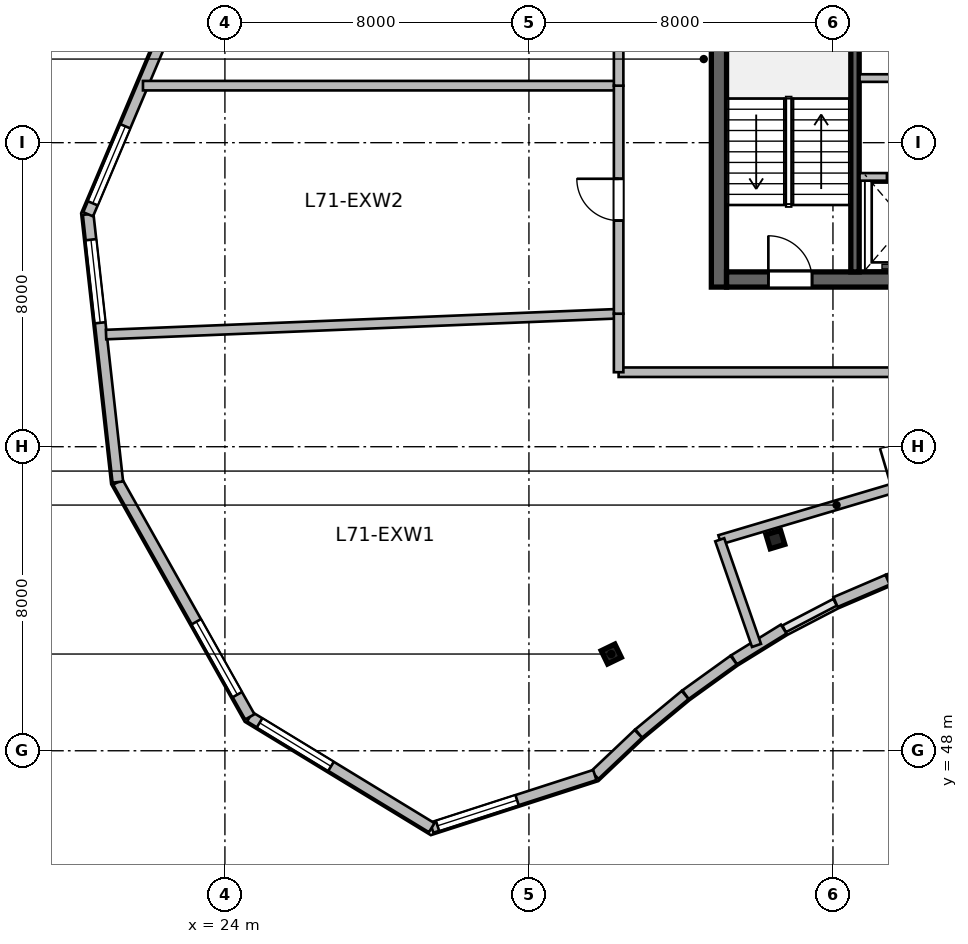
"""IFC4 building model, lengths in metres.
Left out: names, types, materials, properties, quantities, classifications, styles, units other than length and angle.
Written with IfcOpenShell. Run it as: python <this file> out.ifc"""

import sys

from ifc_helpers import new_model, si_unit, direction, frame, frame_2d, origin, origin_2d, place, context, subcontext, project, spatial, rectangle, i_section, extrude, source, transform, mapped, element, fill, save


model = new_model("IFC4")
c1 = context("Model", 3, precision=1e-05, world=origin(), true_north=direction((0.0, 1.0)))
c2 = subcontext(c1, "Body", "Model", "MODEL_VIEW")
j1 = project(units=[si_unit("LENGTHUNIT", "METRE"), si_unit("PLANEANGLEUNIT", "RADIAN")], contexts=[c1])
p1 = place(None, origin())
s1 = spatial("IfcSite", under=j1, at=p1, CompositionType="ELEMENT")
p2 = place(p1, origin())
s2 = spatial("IfcBuilding", under=s1, at=p2, CompositionType="ELEMENT")
p3 = place(p2, frame((0.0, 0.0, 291.3)))
s3 = spatial("IfcBuildingStorey", under=s2, at=p3, CompositionType="ELEMENT", Elevation=291.3)
m1 = source(origin(), c2, "Body", "SweptSolid", [
    extrude(rectangle(XDim=12.0, YDim=0.4, at=frame_2d((6.0, 0.0))), origin(), (0.0, 0.0, 1.0), 3.9),
])
p4 = place(p3, frame((37.0, 60.2, 0.0), z_axis=(0.0, 0.0, 1.0), x_axis=(0.0, 1.0, 0.0)))
e1 = element("IfcWall", 1, at=p4, inside=s3, PredefinedType="SHEAR", context=c2, shape_type="MappedRepresentation", body=[
    mapped(m1, transform((0.0, 0.0, 0.0), scale=1.0)),
])
m2 = source(origin(), c2, "Body", "SweptSolid", [
    extrude(rectangle(XDim=21.6, YDim=0.4, at=frame_2d((10.8, 0.0))), origin(), (0.0, 0.0, 1.0), 3.9),
])
p5 = place(p3, frame((37.2, 60.4, 0.0), z_axis=(0.0, 0.0, 1.0), x_axis=(1.0, 0.0, 0.0)))
e2 = element("IfcWall", 2, at=p5, inside=s3, PredefinedType="SHEAR", context=c2, shape_type="MappedRepresentation", body=[
    mapped(m2, transform((0.0, 0.0, 0.0), scale=1.0)),
])
p6 = place(p5, frame((1.1, 0.0, 0.0)))
e3 = element("IfcOpeningElement", 3, at=p6, cuts=e2, PredefinedType="OPENING", context=c2, shape_type="SweptSolid", body=[
    extrude(rectangle(XDim=1.15, YDim=2.15, at=frame_2d((0.575, 1.075))), frame((0.0, 0.21, 0.0), z_axis=(0.0, -1.0, 0.0), x_axis=(1.0, 0.0, 0.0)), (0.0, 0.0, 1.0), 0.42),
])
p7 = place(p5, frame((19.5, 0.0, 0.0)))
e4 = element("IfcOpeningElement", 4, at=p7, cuts=e2, PredefinedType="OPENING", context=c2, shape_type="SweptSolid", body=[
    extrude(rectangle(XDim=0.9, YDim=2.1, at=frame_2d((0.45, 1.05))), frame((0.0, 0.21, 0.0), z_axis=(0.0, -1.0, 0.0), x_axis=(1.0, 0.0, 0.0)), (0.0, 0.0, 1.0), 0.42),
])
p8 = place(p5, frame((12.02, 0.0, 0.0)))
e5 = element("IfcOpeningElement", 5, at=p8, cuts=e2, PredefinedType="OPENING", context=c2, shape_type="SweptSolid", body=[
    extrude(rectangle(XDim=1.6, YDim=2.15, at=frame_2d((0.8, 1.075))), frame((0.0, 0.21, 0.0), z_axis=(0.0, -1.0, 0.0), x_axis=(1.0, 0.0, 0.0)), (0.0, 0.0, 1.0), 0.42),
])
m3 = source(origin(), c2, "Body", "SweptSolid", [
    extrude(rectangle(XDim=11.2, YDim=0.22, at=frame_2d((5.6, 0.0))), origin(), (0.0, 0.0, 1.0), 3.9),
])
p9 = place(p3, frame((40.58, 60.6, 0.0), z_axis=(0.0, 0.0, 1.0), x_axis=(0.0, 1.0, 0.0)))
e6 = element("IfcWall", 6, at=p9, inside=s3, PredefinedType="SHEAR", context=c2, shape_type="MappedRepresentation", body=[
    mapped(m3, transform((0.0, 0.0, 0.0), scale=1.0)),
])
m4 = source(origin(), c2, "Body", "SweptSolid", [
    extrude(i_section(OverallWidth=0.399, OverallDepth=0.387, WebThickness=0.021, FlangeThickness=0.033, at=origin_2d()), origin(), (0.0, 0.0, 1.0), 3.9),
])
for number, where, z_axis, x_axis in (
    (7, (34.166, 50.545, 0.0), (0.0, 0.0, 1.0), (-0.436, 0.9, 0.0)),
    (8, (38.485, 53.558, 0.0), (0.0, 0.0, 1.0), (-0.289, 0.957, 0.0)),
):
    element("IfcColumn", number, at=place(p3, frame(where, z_axis=z_axis, x_axis=x_axis)), inside=s3, PredefinedType="COLUMN", context=c2, shape_type="MappedRepresentation", body=[
        mapped(m4, transform((0.0, 0.0, 0.0), scale=1.0)),
    ])
m5 = source(origin(), c2, "Body", "SweptSolid", [
    extrude(rectangle(XDim=1.473, YDim=0.28, at=frame_2d((0.736, 0.0))), origin(), (0.0, 0.0, 1.0), 3.64),
])
p10 = place(p3, frame((42.845, 52.979, 0.0), z_axis=(0.0, 0.0, 1.0), x_axis=(-0.946641296917, -0.322289086026, 0.0)))
e9 = element("IfcWall", 9, at=p10, inside=s3, PredefinedType="SOLIDWALL", context=c2, shape_type="MappedRepresentation", body=[
    mapped(m5, transform((0.0, 0.0, 0.0), scale=1.0)),
])
m6 = source(origin(), c2, "Body", "SweptSolid", [
    extrude(rectangle(XDim=1.49, YDim=0.28, at=frame_2d((0.745, 0.0))), origin(), (0.0, 0.0, 1.0), 3.64),
])
p11 = place(p3, frame((41.438, 52.5, 0.0), z_axis=(0.0, 0.0, 1.0), x_axis=(-0.919009427656, -0.394235553799, 0.0)))
e10 = element("IfcWall", 10, at=p11, inside=s3, PredefinedType="SOLIDWALL", context=c2, shape_type="MappedRepresentation", body=[
    mapped(m6, transform((0.0, 0.0, 0.0), scale=1.0)),
])
m7 = source(origin(), c2, "Body", "SweptSolid", [
    extrude(rectangle(XDim=1.535, YDim=0.28, at=frame_2d((0.768, 0.0))), origin(), (0.0, 0.0, 1.0), 3.64),
])
p12 = place(p3, frame((38.704, 51.201, 0.0), z_axis=(0.0, 0.0, 1.0), x_axis=(-0.850756173541, -0.525560589449, 0.0)))
e11 = element("IfcWall", 11, at=p12, inside=s3, PredefinedType="SOLIDWALL", context=c2, shape_type="MappedRepresentation", body=[
    mapped(m7, transform((0.0, 0.0, 0.0), scale=1.0)),
])
m8 = source(origin(), c2, "Body", "SweptSolid", [
    extrude(rectangle(XDim=1.561, YDim=0.28, at=frame_2d((0.781, 0.0))), origin(), (0.0, 0.0, 1.0), 3.64),
])
p13 = place(p3, frame((37.387, 50.387, 0.0), z_axis=(0.0, 0.0, 1.0), x_axis=(-0.81154027425, -0.584296485758, 0.0)))
e12 = element("IfcWall", 12, at=p13, inside=s3, PredefinedType="SOLIDWALL", context=c2, shape_type="MappedRepresentation", body=[
    mapped(m8, transform((0.0, 0.0, 0.0), scale=1.0)),
])
m9 = source(origin(), c2, "Body", "SweptSolid", [
    extrude(rectangle(XDim=1.589, YDim=0.28, at=frame_2d((0.794, 0.0))), origin(), (0.0, 0.0, 1.0), 3.64),
])
p14 = place(p3, frame((36.11, 49.468, 0.0), z_axis=(0.0, 0.0, 1.0), x_axis=(-0.769805836273, -0.63827813251, 0.0)))
e13 = element("IfcWall", 13, at=p14, inside=s3, PredefinedType="SOLIDWALL", context=c2, shape_type="MappedRepresentation", body=[
    mapped(m9, transform((0.0, 0.0, 0.0), scale=1.0)),
])
m10 = source(origin(), c2, "Body", "SweptSolid", [
    extrude(rectangle(XDim=1.577, YDim=0.28, at=frame_2d((0.789, 0.0))), origin(), (0.0, 0.0, 1.0), 3.64),
])
p15 = place(p3, frame((34.878, 48.446, 0.0), z_axis=(0.0, 0.0, 1.0), x_axis=(-0.726119464467, -0.687568558998, 0.0)))
e14 = element("IfcWall", 14, at=p15, inside=s3, PredefinedType="SOLIDWALL", context=c2, shape_type="MappedRepresentation", body=[
    mapped(m10, transform((0.0, 0.0, 0.0), scale=1.0)),
])
m11 = source(origin(), c2, "Body", "SweptSolid", [
    extrude(rectangle(XDim=4.509, YDim=0.28, at=frame_2d((2.255, 0.0))), origin(), (0.0, 0.0, 1.0), 3.64),
])
p16 = place(p3, frame((33.733, 47.361, 0.0), z_axis=(0.0, 0.0, 1.0), x_axis=(-0.95162949292, -0.307247958828, 0.0)))
e15 = element("IfcWall", 15, at=p16, inside=s3, PredefinedType="SOLIDWALL", context=c2, shape_type="MappedRepresentation", body=[
    mapped(m11, transform((0.0, 0.0, 0.0), scale=1.0)),
])
p17 = place(p16, frame((2.149, 0.0, 0.95)))
e16 = element("IfcOpeningElement", 16, at=p17, cuts=e15, PredefinedType="OPENING", context=c2, shape_type="SweptSolid", body=[
    extrude(rectangle(XDim=2.2, YDim=2.1, at=frame_2d((1.1, 1.05))), frame((0.0, 0.15, 0.0), z_axis=(0.0, -1.0, 0.0), x_axis=(1.0, 0.0, 0.0)), (0.0, 0.0, 1.0), 0.3),
])
m12 = source(origin(), c2, "Body", "SweptSolid", [
    extrude(rectangle(XDim=5.604, YDim=0.28, at=frame_2d((2.802, 0.0))), origin(), (0.0, 0.0, 1.0), 3.64),
])
p18 = place(p3, frame((29.442, 45.976, 0.0), z_axis=(0.0, 0.0, 1.0), x_axis=(-0.854002492971, 0.520268913158, 0.0)))
e17 = element("IfcWall", 17, at=p18, inside=s3, PredefinedType="SOLIDWALL", context=c2, shape_type="MappedRepresentation", body=[
    mapped(m12, transform((0.0, 0.0, 0.0), scale=1.0)),
])
p19 = place(p18, frame((3.103, 0.0, 0.95)))
e18 = element("IfcOpeningElement", 18, at=p19, cuts=e17, PredefinedType="OPENING", context=c2, shape_type="SweptSolid", body=[
    extrude(rectangle(XDim=2.2, YDim=2.1, at=frame_2d((1.1, 1.05))), frame((0.0, 0.15, 0.0), z_axis=(0.0, -1.0, 0.0), x_axis=(1.0, 0.0, 0.0)), (0.0, 0.0, 1.0), 0.3),
])
m13 = source(origin(), c2, "Body", "SweptSolid", [
    extrude(rectangle(XDim=7.087, YDim=0.28, at=frame_2d((3.543, 0.0))), origin(), (0.0, 0.0, 1.0), 3.64),
])
p20 = place(p3, frame((24.656, 48.892, 0.0), z_axis=(0.0, 0.0, 1.0), x_axis=(-0.490158199368, 0.871633489256, 0.0)))
e19 = element("IfcWall", 19, at=p20, inside=s3, PredefinedType="SOLIDWALL", context=c2, shape_type="MappedRepresentation", body=[
    mapped(m13, transform((0.0, 0.0, 0.0), scale=1.0)),
])
p21 = place(p20, frame((0.672, 0.0, 0.95)))
e20 = element("IfcOpeningElement", 20, at=p21, cuts=e19, PredefinedType="OPENING", context=c2, shape_type="SweptSolid", body=[
    extrude(rectangle(XDim=2.2, YDim=2.1, at=frame_2d((1.1, 1.05))), frame((0.0, 0.15, 0.0), z_axis=(0.0, -1.0, 0.0), x_axis=(1.0, 0.0, 0.0)), (0.0, 0.0, 1.0), 0.3),
])
m14 = source(origin(), c2, "Body", "SweptSolid", [
    extrude(rectangle(XDim=7.09, YDim=0.28, at=frame_2d((3.545, 0.0))), origin(), (0.0, 0.0, 1.0), 3.64),
])
p22 = place(p3, frame((21.182, 55.069, 0.0), z_axis=(0.0, 0.0, 1.0), x_axis=(-0.110159396922, 0.993913933532, 0.0)))
e21 = element("IfcWall", 21, at=p22, inside=s3, PredefinedType="SOLIDWALL", context=c2, shape_type="MappedRepresentation", body=[
    mapped(m14, transform((0.0, 0.0, 0.0), scale=1.0)),
])
p23 = place(p22, frame((4.217, 0.0, 0.95)))
e22 = element("IfcOpeningElement", 22, at=p23, cuts=e21, PredefinedType="OPENING", context=c2, shape_type="SweptSolid", body=[
    extrude(rectangle(XDim=2.2, YDim=2.1, at=frame_2d((1.1, 1.05))), frame((0.0, 0.15, 0.0), z_axis=(0.0, -1.0, 0.0), x_axis=(1.0, 0.0, 0.0)), (0.0, 0.0, 1.0), 0.3),
])
m15 = source(origin(), c2, "Body", "SweptSolid", [
    extrude(rectangle(XDim=5.655, YDim=0.28, at=frame_2d((2.828, 0.0))), origin(), (0.0, 0.0, 1.0), 3.64),
])
p24 = place(p3, frame((20.401, 62.116, 0.0), z_axis=(0.0, 0.0, 1.0), x_axis=(0.389585063528, 0.920990487614, 0.0)))
e23 = element("IfcWall", 23, at=p24, inside=s3, PredefinedType="SOLIDWALL", context=c2, shape_type="MappedRepresentation", body=[
    mapped(m15, transform((0.0, 0.0, 0.0), scale=1.0)),
])
p25 = place(p24, frame((0.314, 0.0, 0.95)))
e24 = element("IfcOpeningElement", 24, at=p25, cuts=e23, PredefinedType="OPENING", context=c2, shape_type="SweptSolid", body=[
    extrude(rectangle(XDim=2.2, YDim=2.1, at=frame_2d((1.1, 1.05))), frame((0.0, 0.15, 0.0), z_axis=(0.0, -1.0, 0.0), x_axis=(1.0, 0.0, 0.0)), (0.0, 0.0, 1.0), 0.3),
])
m16 = source(origin(), c2, "Body", "SweptSolid", [
    extrude(rectangle(XDim=8.02, YDim=0.2, at=frame_2d((4.01, 0.0))), origin(), (0.0, 0.0, 1.0), 3.64),
])
p26 = place(p3, frame((40.7, 63.1, 0.0), z_axis=(0.0, 0.0, 1.0), x_axis=(1.0, 0.0, 0.0)))
e25 = element("IfcWall", 25, at=p26, inside=s3, PredefinedType="SOLIDWALL", context=c2, shape_type="MappedRepresentation", body=[
    mapped(m16, transform((0.0, 0.0, 0.0), scale=1.0)),
])
p27 = place(p26, frame((0.72, 0.0, 0.0)))
e26 = element("IfcOpeningElement", 26, at=p27, cuts=e25, PredefinedType="OPENING", context=c2, shape_type="SweptSolid", body=[
    extrude(rectangle(XDim=1.0, YDim=2.15, at=frame_2d((0.5, 1.075))), frame((0.0, 0.11, 0.0), z_axis=(0.0, -1.0, 0.0), x_axis=(1.0, 0.0, 0.0)), (0.0, 0.0, 1.0), 0.22),
])
p28 = place(p26, frame((2.62, 0.0, 0.0)))
e27 = element("IfcOpeningElement", 27, at=p28, cuts=e25, PredefinedType="OPENING", context=c2, shape_type="SweptSolid", body=[
    extrude(rectangle(XDim=1.0, YDim=2.15, at=frame_2d((0.5, 1.075))), frame((0.0, 0.11, 0.0), z_axis=(0.0, -1.0, 0.0), x_axis=(1.0, 0.0, 0.0)), (0.0, 0.0, 1.0), 0.22),
])
p29 = place(p26, frame((4.55, 0.0, 0.0)))
e28 = element("IfcOpeningElement", 28, at=p29, cuts=e25, PredefinedType="OPENING", context=c2, shape_type="SweptSolid", body=[
    extrude(rectangle(XDim=1.0, YDim=2.15, at=frame_2d((0.5, 1.075))), frame((0.0, 0.11, 0.0), z_axis=(0.0, -1.0, 0.0), x_axis=(1.0, 0.0, 0.0)), (0.0, 0.0, 1.0), 0.22),
])
p30 = place(p26, frame((6.55, 0.0, 0.0)))
e29 = element("IfcOpeningElement", 29, at=p30, cuts=e25, PredefinedType="OPENING", context=c2, shape_type="SweptSolid", body=[
    extrude(rectangle(XDim=1.0, YDim=2.15, at=frame_2d((0.5, 1.075))), frame((0.0, 0.11, 0.0), z_axis=(0.0, -1.0, 0.0), x_axis=(1.0, 0.0, 0.0)), (0.0, 0.0, 1.0), 0.22),
])
m17 = source(origin(), c2, "Body", "SweptSolid", [
    extrude(rectangle(XDim=8.8, YDim=0.2, at=frame_2d((4.4, 0.0))), origin(), (0.0, 0.0, 1.0), 3.64),
])
p31 = place(p3, frame((40.7, 65.7, 0.0), z_axis=(0.0, 0.0, 1.0), x_axis=(1.0, 0.0, 0.0)))
e30 = element("IfcWall", 30, at=p31, inside=s3, PredefinedType="SOLIDWALL", context=c2, shape_type="MappedRepresentation", body=[
    mapped(m17, transform((0.0, 0.0, 0.0), scale=1.0)),
])
p32 = place(p31, frame((3.8, 0.0, 0.0)))
e31 = element("IfcOpeningElement", 31, at=p32, cuts=e30, PredefinedType="OPENING", context=c2, shape_type="SweptSolid", body=[
    extrude(rectangle(XDim=0.95, YDim=2.15, at=frame_2d((0.475, 1.075))), frame((0.0, 0.11, 0.0), z_axis=(0.0, -1.0, 0.0), x_axis=(1.0, 0.0, 0.0)), (0.0, 0.0, 1.0), 0.22),
])
m18 = source(origin(), c2, "Body", "SweptSolid", [
    extrude(rectangle(XDim=11.454, YDim=0.25, at=frame_2d((5.727, 0.0))), origin(), (0.0, 0.0, 1.0), 3.314),
])
p33 = place(p3, frame((37.021, 53.552, 0.0), z_axis=(0.0, 0.0, 1.0), x_axis=(0.958594874645, 0.284773359541, 0.0)))
e32 = element("IfcWall", 32, at=p33, inside=s3, PredefinedType="PARTITIONING", context=c2, shape_type="MappedRepresentation", body=[
    mapped(m18, transform((0.0, 0.0, 0.0), scale=1.0)),
])
p34 = place(p33, frame((4.727, 0.0, 0.0)))
e33 = element("IfcOpeningElement", 33, at=p34, cuts=e32, PredefinedType="OPENING", context=c2, shape_type="SweptSolid", body=[
    extrude(rectangle(XDim=1.1, YDim=2.15, at=frame_2d((0.55, 1.075))), frame((0.0, 0.135, 0.0), z_axis=(0.0, -1.0, 0.0), x_axis=(1.0, 0.0, 0.0)), (0.0, 0.0, 1.0), 0.27),
])
m19 = source(origin(), c2, "Body", "SweptSolid", [
    extrude(rectangle(XDim=2.944, YDim=0.25, at=frame_2d((1.472, 0.0))), origin(), (0.0, 0.0, 1.0), 3.64),
])
p35 = place(p3, frame((37.988, 50.771, 0.0), z_axis=(0.0, 0.0, 1.0), x_axis=(-0.328565655286, 0.944481132774, 0.0)))
e34 = element("IfcWall", 34, at=p35, inside=s3, PredefinedType="PARTITIONING", context=c2, shape_type="MappedRepresentation", body=[
    mapped(m19, transform((0.0, 0.0, 0.0), scale=1.0)),
])
m20 = source(origin(), c2, "Body", "SweptSolid", [
    extrude(rectangle(XDim=12.39, YDim=0.25, at=frame_2d((6.195, 0.0))), origin(), (0.0, 0.0, 1.0), 3.64),
])
p36 = place(p3, frame((34.36, 57.96, 0.0), z_axis=(0.0, 0.0, 1.0), x_axis=(1.0, 0.0, 0.0)))
e35 = element("IfcWall", 35, at=p36, inside=s3, PredefinedType="PARTITIONING", context=c2, shape_type="MappedRepresentation", body=[
    mapped(m20, transform((0.0, 0.0, 0.0), scale=1.0)),
])
m21 = source(origin(), c2, "Body", "SweptSolid", [
    extrude(rectangle(XDim=13.499, YDim=0.25, at=frame_2d((6.75, 0.0))), origin(), (0.0, 0.0, 1.0), 3.64),
])
p37 = place(p3, frame((20.872, 58.951, 0.0), z_axis=(0.0, 0.0, 1.0), x_axis=(0.999172424054, 0.04067513995, 0.0)))
e36 = element("IfcWall", 36, at=p37, inside=s3, PredefinedType="PARTITIONING", context=c2, shape_type="MappedRepresentation", body=[
    mapped(m21, transform((0.0, 0.0, 0.0), scale=1.0)),
])
m22 = source(origin(), c2, "Body", "SweptSolid", [
    extrude(rectangle(XDim=1.54, YDim=0.25, at=frame_2d((0.77, 0.0))), origin(), (0.0, 0.0, 1.0), 3.64),
])
p38 = place(p3, frame((34.36, 57.96, 0.0), z_axis=(0.0, 0.0, 1.0), x_axis=(0.0, 1.0, 0.0)))
e37 = element("IfcWall", 37, at=p38, inside=s3, PredefinedType="PARTITIONING", context=c2, shape_type="MappedRepresentation", body=[
    mapped(m22, transform((0.0, 0.0, 0.0), scale=1.0)),
])
m23 = source(origin(), c2, "Body", "SweptSolid", [
    extrude(rectangle(XDim=12.517, YDim=0.25, at=frame_2d((6.258, 0.0))), origin(), (0.0, 0.0, 1.0), 3.64),
])
p39 = place(p3, frame((21.844, 65.5, 0.0), z_axis=(0.0, 0.0, 1.0), x_axis=(1.0, 0.0, 0.0)))
e38 = element("IfcWall", 38, at=p39, inside=s3, PredefinedType="PARTITIONING", context=c2, shape_type="MappedRepresentation", body=[
    mapped(m23, transform((0.0, 0.0, 0.0), scale=1.0)),
])
m24 = source(origin(), c2, "Body", "SweptSolid", [
    extrude(rectangle(XDim=6.0, YDim=0.25, at=frame_2d((3.0, 0.0))), origin(), (0.0, 0.0, 1.0), 3.64),
])
p40 = place(p3, frame((34.36, 59.5, 0.0), z_axis=(0.0, 0.0, 1.0), x_axis=(0.0, 1.0, 0.0)))
e39 = element("IfcWall", 39, at=p40, inside=s3, PredefinedType="PARTITIONING", context=c2, shape_type="MappedRepresentation", body=[
    mapped(m24, transform((0.0, 0.0, 0.0), scale=1.0)),
])
p41 = place(p40, frame((2.45, 0.0, 0.0)))
e40 = element("IfcOpeningElement", 40, at=p41, cuts=e39, PredefinedType="OPENING", context=c2, shape_type="SweptSolid", body=[
    extrude(rectangle(XDim=1.1, YDim=2.15, at=frame_2d((0.55, 1.075))), frame((0.0, 0.135, 0.0), z_axis=(0.0, -1.0, 0.0), x_axis=(1.0, 0.0, 0.0)), (0.0, 0.0, 1.0), 0.27),
])
m25 = source(origin(), c2, "Body", "SweptSolid", [
    extrude(rectangle(XDim=10.141, YDim=0.25, at=frame_2d((5.07, 0.0))), origin(), (0.0, 0.0, 1.0), 3.64),
])
p42 = place(p3, frame((34.36, 65.5, 0.0), z_axis=(0.0, 0.0, 1.0), x_axis=(0.0, 1.0, 0.0)))
e41 = element("IfcWall", 41, at=p42, inside=s3, PredefinedType="PARTITIONING", context=c2, shape_type="MappedRepresentation", body=[
    mapped(m25, transform((0.0, 0.0, 0.0), scale=1.0)),
])
p43 = place(p42, frame((4.521, 0.0, 0.0)))
e42 = element("IfcOpeningElement", 42, at=p43, cuts=e41, PredefinedType="OPENING", context=c2, shape_type="SweptSolid", body=[
    extrude(rectangle(XDim=1.1, YDim=2.15, at=frame_2d((0.55, 1.075))), frame((0.0, 0.135, 0.0), z_axis=(0.0, -1.0, 0.0), x_axis=(1.0, 0.0, 0.0)), (0.0, 0.0, 1.0), 0.27),
])
m26 = source(origin(), c2, "Body", "SweptSolid", [
    extrude(rectangle(XDim=2.2, YDim=2.1, at=frame_2d((1.1, 1.05))), frame((0.0, 0.03, 0.0), z_axis=(0.0, -1.0, 0.0), x_axis=(1.0, 0.0, 0.0)), (0.0, 0.0, 1.0), 0.06),
])
p44 = place(p17, origin())
e43 = element("IfcWindow", 43, at=p44, inside=s3, PartitioningType="TRIPLE_PANEL_VERTICAL", PredefinedType="WINDOW", context=c2, shape_type="MappedRepresentation", body=[
    mapped(m26, transform((0.0, 0.0, 0.0), scale=1.0)),
])
fill(e16, e43)
p45 = place(p19, origin())
e44 = element("IfcWindow", 44, at=p45, inside=s3, PartitioningType="TRIPLE_PANEL_VERTICAL", PredefinedType="WINDOW", context=c2, shape_type="MappedRepresentation", body=[
    mapped(m26, transform((0.0, 0.0, 0.0), scale=1.0)),
])
fill(e18, e44)
p46 = place(p21, origin())
e45 = element("IfcWindow", 45, at=p46, inside=s3, PartitioningType="TRIPLE_PANEL_VERTICAL", PredefinedType="WINDOW", context=c2, shape_type="MappedRepresentation", body=[
    mapped(m26, transform((0.0, 0.0, 0.0), scale=1.0)),
])
fill(e20, e45)
p47 = place(p23, origin())
e46 = element("IfcWindow", 46, at=p47, inside=s3, PartitioningType="TRIPLE_PANEL_VERTICAL", PredefinedType="WINDOW", context=c2, shape_type="MappedRepresentation", body=[
    mapped(m26, transform((0.0, 0.0, 0.0), scale=1.0)),
])
fill(e22, e46)
p48 = place(p25, origin())
e47 = element("IfcWindow", 47, at=p48, inside=s3, PartitioningType="TRIPLE_PANEL_VERTICAL", PredefinedType="WINDOW", context=c2, shape_type="MappedRepresentation", body=[
    mapped(m26, transform((0.0, 0.0, 0.0), scale=1.0)),
])
fill(e24, e47)
m27 = source(origin(), c2, "Body", "SweptSolid", [
    extrude(rectangle(XDim=1.15, YDim=2.15, at=frame_2d((0.575, 1.075))), frame((0.0, 0.025, 0.0), z_axis=(0.0, -1.0, 0.0), x_axis=(1.0, 0.0, 0.0)), (0.0, 0.0, 1.0), 0.05),
])
p49 = place(p6, origin())
e48 = element("IfcDoor", 48, at=p49, inside=s3, OperationType="SINGLE_SWING_LEFT", PredefinedType="DOOR", context=c2, shape_type="MappedRepresentation", body=[
    mapped(m27, transform((0.0, 0.0, 0.0), scale=1.0)),
])
fill(e3, e48)
m28 = source(origin(), c2, "Body", "SweptSolid", [
    extrude(rectangle(XDim=1.0, YDim=2.15, at=frame_2d((0.5, 1.075))), frame((0.0, 0.025, 0.0), z_axis=(0.0, -1.0, 0.0), x_axis=(1.0, 0.0, 0.0)), (0.0, 0.0, 1.0), 0.05),
])
p50 = place(p27, origin())
e49 = element("IfcDoor", 49, at=p50, inside=s3, OperationType="DOUBLE_DOOR_SLIDING", PredefinedType="DOOR", context=c2, shape_type="MappedRepresentation", body=[
    mapped(m28, transform((0.0, 0.0, 0.0), scale=1.0)),
])
fill(e26, e49)
m29 = source(origin(), c2, "Body", "SweptSolid", [
    extrude(rectangle(XDim=1.1, YDim=2.15, at=frame_2d((0.55, 1.075))), frame((0.0, 0.025, 0.0), z_axis=(0.0, -1.0, 0.0), x_axis=(1.0, 0.0, 0.0)), (0.0, 0.0, 1.0), 0.05),
])
p51 = place(p41, origin())
e50 = element("IfcDoor", 50, at=p51, inside=s3, OperationType="SINGLE_SWING_RIGHT", PredefinedType="DOOR", context=c2, shape_type="MappedRepresentation", body=[
    mapped(m29, transform((0.0, 0.0, 0.0), scale=1.0)),
])
fill(e40, e50)
save(model, sys.argv[1])
